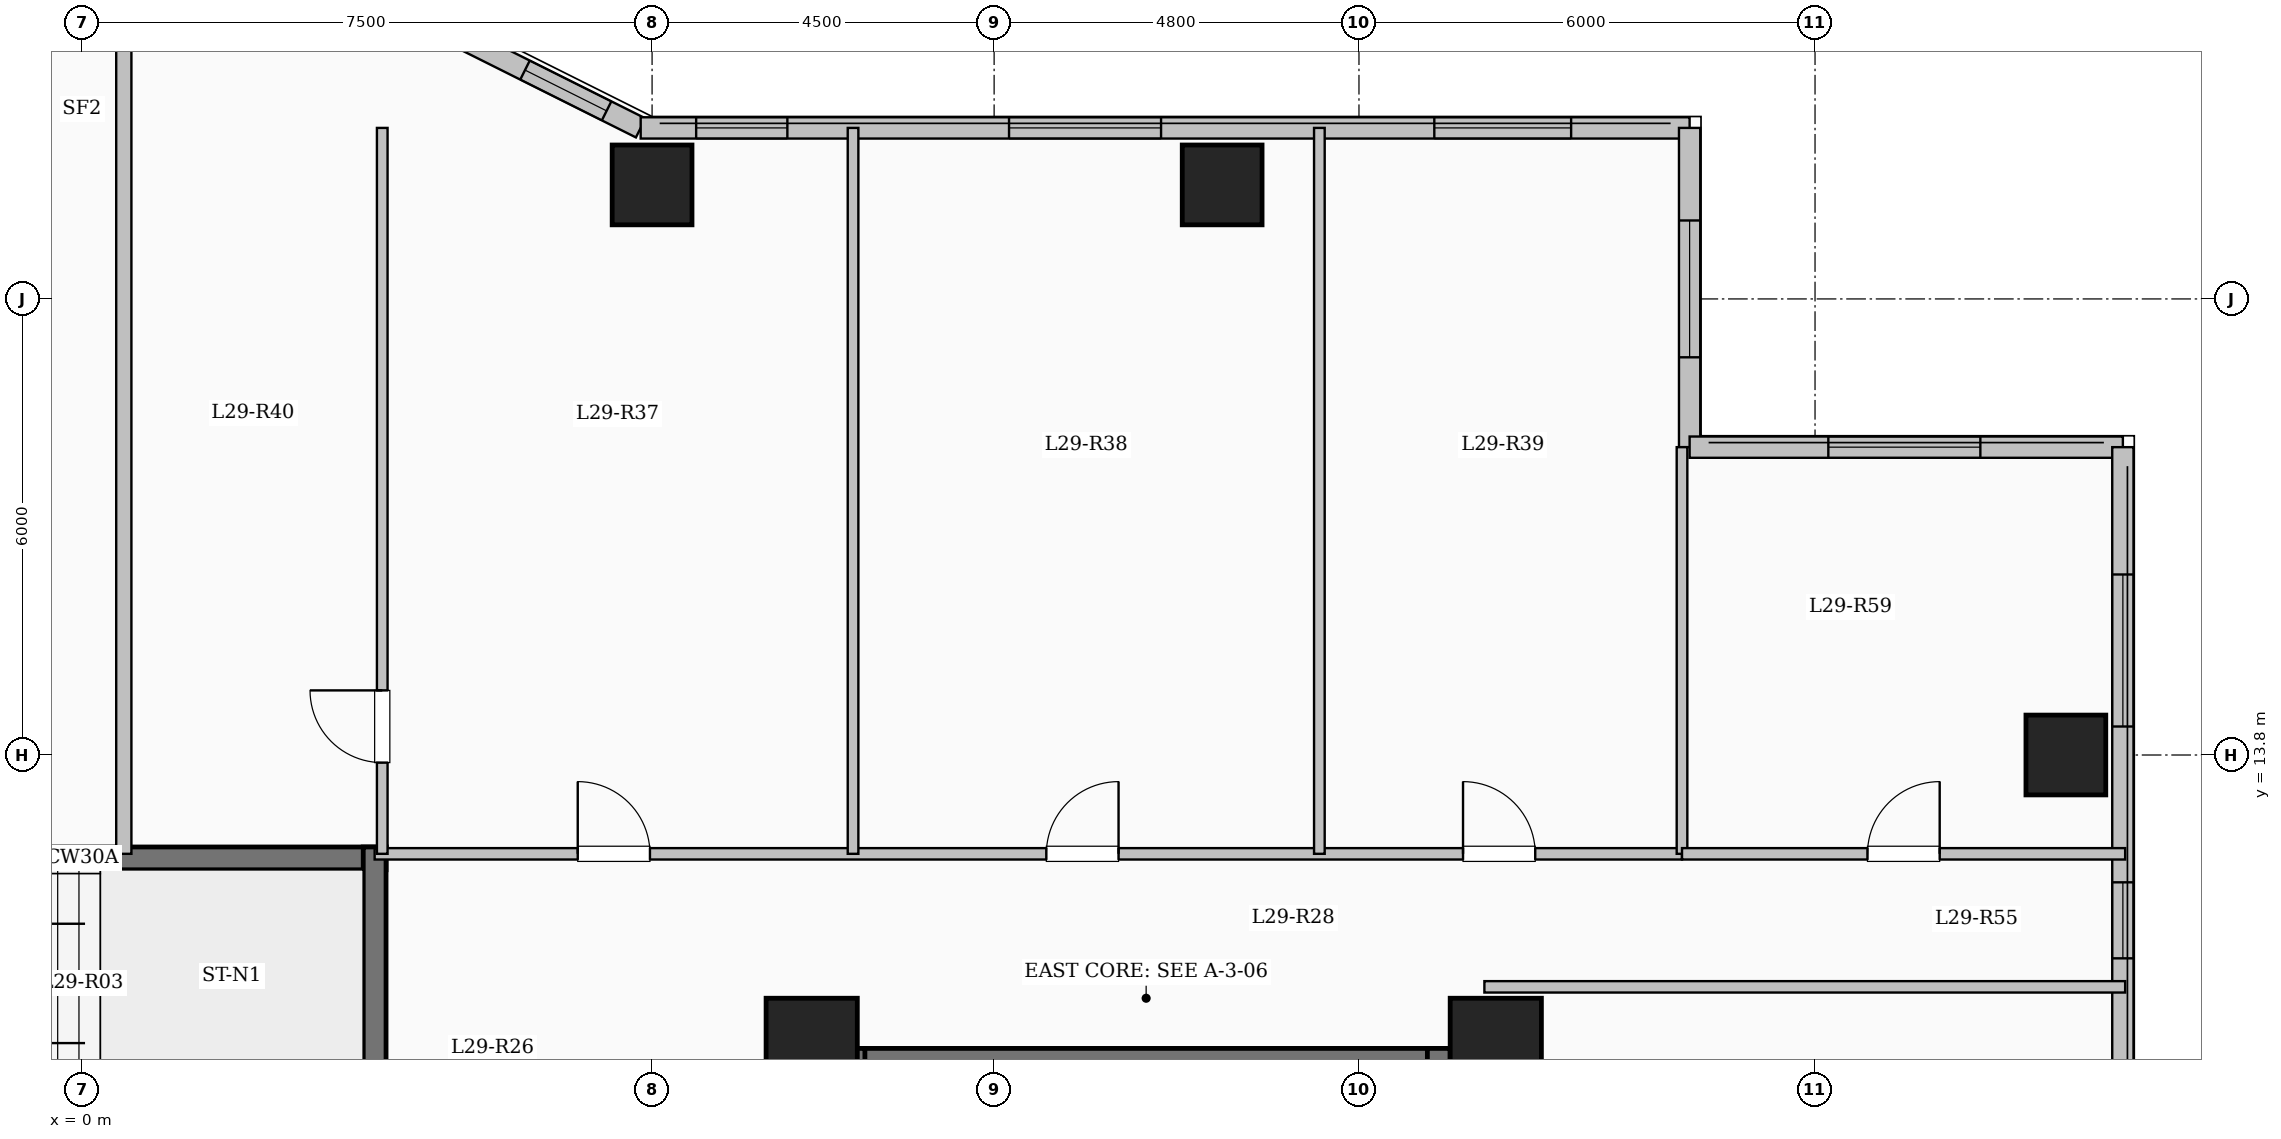
"""IFC4 building model, lengths in metres.
Left out: names, types, materials, properties, quantities, classifications, styles, units other than length and angle.
Written with IfcOpenShell. Run it as: python <this file> out.ifc"""

import sys

from ifc_helpers import new_model, si_unit, direction, frame, frame_2d, origin, origin_2d, place, context, subcontext, project, spatial, rectangle, extrude, element, fill, save


model = new_model("IFC4")
c1 = context("Model", 3, precision=1e-05, world=origin(), true_north=direction((0.0, 1.0)))
c2 = subcontext(c1, "Body", "Model", "MODEL_VIEW")
j1 = project(units=[si_unit("LENGTHUNIT", "METRE"), si_unit("PLANEANGLEUNIT", "RADIAN")], contexts=[c1])
p1 = place(None, origin())
s1 = spatial("IfcSite", under=j1, at=p1, CompositionType="ELEMENT")
p2 = place(p1, origin())
s2 = spatial("IfcBuilding", under=s1, at=p2, CompositionType="ELEMENT")
p3 = place(p2, frame((0.0, 0.0, 108.45)))
s3 = spatial("IfcBuildingStorey", under=s2, at=p3, CompositionType="ELEMENT", Elevation=108.45)
for number, where, z_axis, x_axis in (
    (1, (9.6, 10.0, 0.0), (0.0, 0.0, 1.0), (1.0, 0.0, 0.0)),
    (2, (18.6, 10.0, 0.0), (0.0, 0.0, 1.0), (1.0, 0.0, 0.0)),
):
    element("IfcColumn", number, at=place(p3, frame(where, z_axis=z_axis, x_axis=x_axis)), inside=s3, PredefinedType="COLUMN", context=c2, shape_type="SweptSolid", body=[
        extrude(rectangle(XDim=1.2, YDim=1.2, at=origin_2d()), origin(), (0.0, 0.0, 1.0), 3.35),
    ])
for number, where, z_axis, x_axis in (
    (3, (7.5, 21.3, 0.0), (0.0, 0.0, 1.0), (1.0, 0.0, 0.0)),
    (4, (15.0, 21.3, 0.0), (0.0, 0.0, 1.0), (1.0, 0.0, 0.0)),
    (5, (26.1, 13.8, 0.0), (0.0, 0.0, 1.0), (1.0, 0.0, 0.0)),
):
    element("IfcColumn", number, at=place(p3, frame(where, z_axis=z_axis, x_axis=x_axis)), inside=s3, PredefinedType="COLUMN", context=c2, shape_type="SweptSolid", body=[
        extrude(rectangle(XDim=1.05, YDim=1.05, at=origin_2d()), origin(), (0.0, 0.0, 1.0), 3.35),
    ])
p4 = place(p3, frame((4.35, 23.55, 0.0), z_axis=(0.0, 0.0, 1.0), x_axis=(0.894427191, -0.4472135955, 0.0)))
e6 = element("IfcWall", 6, at=p4, inside=s3, PredefinedType="SOLIDWALL", context=c2, shape_type="SweptSolid", body=[
    extrude(rectangle(XDim=3.354, YDim=0.28, at=frame_2d((1.677, 0.0))), origin(), (0.0, 0.0, 1.0), 3.1),
])
p5 = place(p4, frame((1.653, 0.0, 0.95)))
e7 = element("IfcOpeningElement", 7, at=p5, cuts=e6, PredefinedType="OPENING", context=c2, shape_type="SweptSolid", body=[
    extrude(rectangle(XDim=1.2, YDim=1.5, at=frame_2d((0.6, 0.75))), frame((0.0, 0.15, 0.0), z_axis=(0.0, -1.0, 0.0), x_axis=(1.0, 0.0, 0.0)), (0.0, 0.0, 1.0), 0.3),
])
p6 = place(p3, frame((7.35, 22.05, 0.0), z_axis=(0.0, 0.0, 1.0), x_axis=(1.0, 0.0, 0.0)))
e8 = element("IfcWall", 8, at=p6, inside=s3, PredefinedType="SOLIDWALL", context=c2, shape_type="SweptSolid", body=[
    extrude(rectangle(XDim=13.8, YDim=0.28, at=frame_2d((6.9, 0.0))), origin(), (0.0, 0.0, 1.0), 3.1),
])
p7 = place(p6, frame((0.73, 0.0, 0.95)))
e9 = element("IfcOpeningElement", 9, at=p7, cuts=e8, PredefinedType="OPENING", context=c2, shape_type="SweptSolid", body=[
    extrude(rectangle(XDim=1.2, YDim=1.5, at=frame_2d((0.6, 0.75))), frame((0.0, 0.15, 0.0), z_axis=(0.0, -1.0, 0.0), x_axis=(1.0, 0.0, 0.0)), (0.0, 0.0, 1.0), 0.3),
])
p8 = place(p6, frame((4.846, 0.0, 0.9)))
e10 = element("IfcOpeningElement", 10, at=p8, cuts=e8, PredefinedType="OPENING", context=c2, shape_type="SweptSolid", body=[
    extrude(rectangle(XDim=2.0, YDim=1.7, at=frame_2d((1.0, 0.85))), frame((0.0, 0.15, 0.0), z_axis=(0.0, -1.0, 0.0), x_axis=(1.0, 0.0, 0.0)), (0.0, 0.0, 1.0), 0.3),
])
p9 = place(p6, frame((10.441, 0.0, 0.9)))
e11 = element("IfcOpeningElement", 11, at=p9, cuts=e8, PredefinedType="OPENING", context=c2, shape_type="SweptSolid", body=[
    extrude(rectangle(XDim=1.8, YDim=1.65, at=frame_2d((0.9, 0.825))), frame((0.0, 0.15, 0.0), z_axis=(0.0, -1.0, 0.0), x_axis=(1.0, 0.0, 0.0)), (0.0, 0.0, 1.0), 0.3),
])
p10 = place(p3, frame((21.15, 22.05, 0.0), z_axis=(0.0, 0.0, 1.0), x_axis=(0.0, -1.0, 0.0)))
e12 = element("IfcWall", 12, at=p10, inside=s3, PredefinedType="SOLIDWALL", context=c2, shape_type="SweptSolid", body=[
    extrude(rectangle(XDim=4.2, YDim=0.28, at=frame_2d((2.1, 0.0))), origin(), (0.0, 0.0, 1.0), 3.1),
])
p11 = place(p10, frame((1.218, 0.0, 0.9)))
e13 = element("IfcOpeningElement", 13, at=p11, cuts=e12, PredefinedType="OPENING", context=c2, shape_type="SweptSolid", body=[
    extrude(rectangle(XDim=1.8, YDim=1.65, at=frame_2d((0.9, 0.825))), frame((0.0, 0.15, 0.0), z_axis=(0.0, -1.0, 0.0), x_axis=(1.0, 0.0, 0.0)), (0.0, 0.0, 1.0), 0.3),
])
p12 = place(p3, frame((21.15, 17.85, 0.0), z_axis=(0.0, 0.0, 1.0), x_axis=(1.0, 0.0, 0.0)))
e14 = element("IfcWall", 14, at=p12, inside=s3, PredefinedType="SOLIDWALL", context=c2, shape_type="SweptSolid", body=[
    extrude(rectangle(XDim=5.7, YDim=0.28, at=frame_2d((2.85, 0.0))), origin(), (0.0, 0.0, 1.0), 3.1),
])
p13 = place(p12, frame((1.825, 0.0, 0.9)))
e15 = element("IfcOpeningElement", 15, at=p13, cuts=e14, PredefinedType="OPENING", context=c2, shape_type="SweptSolid", body=[
    extrude(rectangle(XDim=2.0, YDim=1.7, at=frame_2d((1.0, 0.85))), frame((0.0, 0.15, 0.0), z_axis=(0.0, -1.0, 0.0), x_axis=(1.0, 0.0, 0.0)), (0.0, 0.0, 1.0), 0.3),
])
p14 = place(p3, frame((26.85, 17.85, 0.0), z_axis=(0.0, 0.0, 1.0), x_axis=(0.0, -1.0, 0.0)))
e16 = element("IfcWall", 16, at=p14, inside=s3, PredefinedType="SOLIDWALL", context=c2, shape_type="SweptSolid", body=[
    extrude(rectangle(XDim=35.7, YDim=0.28, at=frame_2d((17.85, 0.0))), origin(), (0.0, 0.0, 1.0), 3.1),
])
p15 = place(p14, frame((1.675, 0.0, 0.9)))
e17 = element("IfcOpeningElement", 17, at=p15, cuts=e16, PredefinedType="OPENING", context=c2, shape_type="SweptSolid", body=[
    extrude(rectangle(XDim=2.0, YDim=1.7, at=frame_2d((1.0, 0.85))), frame((0.0, 0.15, 0.0), z_axis=(0.0, -1.0, 0.0), x_axis=(1.0, 0.0, 0.0)), (0.0, 0.0, 1.0), 0.3),
])
p16 = place(p14, frame((5.725, 0.0, 0.95)))
e18 = element("IfcOpeningElement", 18, at=p16, cuts=e16, PredefinedType="OPENING", context=c2, shape_type="SweptSolid", body=[
    extrude(rectangle(XDim=1.0, YDim=1.5, at=frame_2d((0.5, 0.75))), frame((0.0, 0.15, 0.0), z_axis=(0.0, -1.0, 0.0), x_axis=(1.0, 0.0, 0.0)), (0.0, 0.0, 1.0), 0.3),
])
p17 = place(p14, frame((8.975, 0.0, 0.9)))
e19 = element("IfcOpeningElement", 19, at=p17, cuts=e16, PredefinedType="OPENING", context=c2, shape_type="SweptSolid", body=[
    extrude(rectangle(XDim=2.0, YDim=1.7, at=frame_2d((1.0, 0.85))), frame((0.0, 0.15, 0.0), z_axis=(0.0, -1.0, 0.0), x_axis=(1.0, 0.0, 0.0)), (0.0, 0.0, 1.0), 0.3),
])
p18 = place(p14, frame((13.725, 0.0, 0.9)))
e20 = element("IfcOpeningElement", 20, at=p18, cuts=e16, PredefinedType="OPENING", context=c2, shape_type="SweptSolid", body=[
    extrude(rectangle(XDim=1.8, YDim=1.65, at=frame_2d((0.9, 0.825))), frame((0.0, 0.15, 0.0), z_axis=(0.0, -1.0, 0.0), x_axis=(1.0, 0.0, 0.0)), (0.0, 0.0, 1.0), 0.3),
])
p19 = place(p14, frame((19.55, 0.0, 0.9)))
e21 = element("IfcOpeningElement", 21, at=p19, cuts=e16, PredefinedType="OPENING", context=c2, shape_type="SweptSolid", body=[
    extrude(rectangle(XDim=2.4, YDim=1.8, at=frame_2d((1.2, 0.9))), frame((0.0, 0.15, 0.0), z_axis=(0.0, -1.0, 0.0), x_axis=(1.0, 0.0, 0.0)), (0.0, 0.0, 1.0), 0.3),
])
p20 = place(p14, frame((25.857, 0.0, 0.9)))
e22 = element("IfcOpeningElement", 22, at=p20, cuts=e16, PredefinedType="OPENING", context=c2, shape_type="SweptSolid", body=[
    extrude(rectangle(XDim=1.5, YDim=1.65, at=frame_2d((0.75, 0.825))), frame((0.0, 0.15, 0.0), z_axis=(0.0, -1.0, 0.0), x_axis=(1.0, 0.0, 0.0)), (0.0, 0.0, 1.0), 0.3),
])
p21 = place(p14, frame((30.75, 0.0, 0.9)))
e23 = element("IfcOpeningElement", 23, at=p21, cuts=e16, PredefinedType="OPENING", context=c2, shape_type="SweptSolid", body=[
    extrude(rectangle(XDim=2.4, YDim=1.8, at=frame_2d((1.2, 0.9))), frame((0.0, 0.15, 0.0), z_axis=(0.0, -1.0, 0.0), x_axis=(1.0, 0.0, 0.0)), (0.0, 0.0, 1.0), 0.3),
])
p22 = place(p3, frame((10.0, 9.79, 0.0), z_axis=(0.0, 0.0, 1.0), x_axis=(1.0, 0.0, 0.0)))
e24 = element("IfcWall", 24, at=p22, inside=s3, PredefinedType="SHEAR", context=c2, shape_type="SweptSolid", body=[
    extrude(rectangle(XDim=8.0, YDim=0.3, at=frame_2d((4.0, 0.0))), origin(), (0.0, 0.0, 1.0), 3.35),
])
for number, where, z_axis, x_axis in (
    (25, (10.15, 6.35, 0.0), (0.0, 0.0, 1.0), (0.0, 1.0, 0.0)),
    (26, (17.85, 6.35, 0.0), (0.0, 0.0, 1.0), (0.0, 1.0, 0.0)),
):
    element("IfcWall", number, at=place(p3, frame(where, z_axis=z_axis, x_axis=x_axis)), inside=s3, PredefinedType="SHEAR", context=c2, shape_type="SweptSolid", body=[
        extrude(rectangle(XDim=3.59, YDim=0.3, at=frame_2d((1.795, 0.0))), origin(), (0.0, 0.0, 1.0), 3.35),
    ])
p23 = place(p3, frame((-4.0, 12.44, 0.0), z_axis=(0.0, 0.0, 1.0), x_axis=(1.0, 0.0, 0.0)))
e27 = element("IfcWall", 27, at=p23, inside=s3, PredefinedType="SHEAR", context=c2, shape_type="SweptSolid", body=[
    extrude(rectangle(XDim=8.0, YDim=0.3, at=frame_2d((4.0, 0.0))), origin(), (0.0, 0.0, 1.0), 3.35),
])
p24 = place(p3, frame((3.85, 9.0, 0.0), z_axis=(0.0, 0.0, 1.0), x_axis=(0.0, 1.0, 0.0)))
e28 = element("IfcWall", 28, at=p24, inside=s3, PredefinedType="SHEAR", context=c2, shape_type="SweptSolid", body=[
    extrude(rectangle(XDim=3.59, YDim=0.3, at=frame_2d((1.795, 0.0))), origin(), (0.0, 0.0, 1.0), 3.35),
])
p25 = place(p3, frame((3.85, 12.5, 0.0), z_axis=(0.0, 0.0, 1.0), x_axis=(1.0, 0.0, 0.0)))
e29 = element("IfcWall", 29, at=p25, inside=s3, PredefinedType="PARTITIONING", context=c2, shape_type="SweptSolid", body=[
    extrude(rectangle(XDim=17.2, YDim=0.15, at=frame_2d((8.6, 0.0))), origin(), (0.0, 0.0, 1.0), 3.1),
])
p26 = place(p25, frame((2.672, 0.0, 0.0)))
e30 = element("IfcOpeningElement", 30, at=p26, cuts=e29, PredefinedType="OPENING", context=c2, shape_type="SweptSolid", body=[
    extrude(rectangle(XDim=0.95, YDim=2.15, at=frame_2d((0.475, 1.075))), frame((0.0, 0.085, 0.0), z_axis=(0.0, -1.0, 0.0), x_axis=(1.0, 0.0, 0.0)), (0.0, 0.0, 1.0), 0.17),
])
p27 = place(p25, frame((8.837, 0.0, 0.0)))
e31 = element("IfcOpeningElement", 31, at=p27, cuts=e29, PredefinedType="OPENING", context=c2, shape_type="SweptSolid", body=[
    extrude(rectangle(XDim=0.95, YDim=2.15, at=frame_2d((0.475, 1.075))), frame((0.0, 0.085, 0.0), z_axis=(0.0, -1.0, 0.0), x_axis=(1.0, 0.0, 0.0)), (0.0, 0.0, 1.0), 0.17),
])
p28 = place(p25, frame((14.319, 0.0, 0.0)))
e32 = element("IfcOpeningElement", 32, at=p28, cuts=e29, PredefinedType="OPENING", context=c2, shape_type="SweptSolid", body=[
    extrude(rectangle(XDim=0.95, YDim=2.15, at=frame_2d((0.475, 1.075))), frame((0.0, 0.085, 0.0), z_axis=(0.0, -1.0, 0.0), x_axis=(1.0, 0.0, 0.0)), (0.0, 0.0, 1.0), 0.17),
])
p29 = place(p3, frame((0.55, 12.5, 0.0), z_axis=(0.0, 0.0, 1.0), x_axis=(0.0, 1.0, 0.0)))
e33 = element("IfcWall", 33, at=p29, inside=s3, PredefinedType="SOLIDWALL", context=c2, shape_type="SweptSolid", body=[
    extrude(rectangle(XDim=11.08, YDim=0.2, at=frame_2d((5.54, 0.0))), origin(), (0.0, 0.0, 1.0), 3.1),
])
p30 = place(p3, frame((3.95, 12.5, 0.0), z_axis=(0.0, 0.0, 1.0), x_axis=(0.0, 1.0, 0.0)))
e34 = element("IfcWall", 34, at=p30, inside=s3, PredefinedType="PARTITIONING", context=c2, shape_type="SweptSolid", body=[
    extrude(rectangle(XDim=9.55, YDim=0.14, at=frame_2d((4.775, 0.0))), origin(), (0.0, 0.0, 1.0), 3.1),
])
p31 = place(p30, frame((1.2, 0.0, 0.0)))
e35 = element("IfcOpeningElement", 35, at=p31, cuts=e34, PredefinedType="OPENING", context=c2, shape_type="SweptSolid", body=[
    extrude(rectangle(XDim=0.95, YDim=2.15, at=frame_2d((0.475, 1.075))), frame((0.0, 0.08, 0.0), z_axis=(0.0, -1.0, 0.0), x_axis=(1.0, 0.0, 0.0)), (0.0, 0.0, 1.0), 0.16),
])
for number, where, z_axis, x_axis in (
    (36, (10.144, 12.5, 0.0), (0.0, 0.0, 1.0), (0.0, 1.0, 0.0)),
    (37, (16.279, 12.5, 0.0), (0.0, 0.0, 1.0), (0.0, 1.0, 0.0)),
):
    element("IfcWall", number, at=place(p3, frame(where, z_axis=z_axis, x_axis=x_axis)), inside=s3, PredefinedType="PARTITIONING", context=c2, shape_type="SweptSolid", body=[
        extrude(rectangle(XDim=9.55, YDim=0.14, at=frame_2d((4.775, 0.0))), origin(), (0.0, 0.0, 1.0), 3.1),
    ])
p32 = place(p3, frame((18.45, 10.75, 0.0), z_axis=(0.0, 0.0, 1.0), x_axis=(1.0, 0.0, 0.0)))
e38 = element("IfcWall", 38, at=p32, inside=s3, PredefinedType="PARTITIONING", context=c2, shape_type="SweptSolid", body=[
    extrude(rectangle(XDim=8.43, YDim=0.15, at=frame_2d((4.215, 0.0))), origin(), (0.0, 0.0, 1.0), 3.1),
])
p33 = place(p3, frame((21.05, 12.5, 0.0), z_axis=(0.0, 0.0, 1.0), x_axis=(0.0, 1.0, 0.0)))
e39 = element("IfcWall", 39, at=p33, inside=s3, PredefinedType="PARTITIONING", context=c2, shape_type="SweptSolid", body=[
    extrude(rectangle(XDim=5.35, YDim=0.14, at=frame_2d((2.675, 0.0))), origin(), (0.0, 0.0, 1.0), 3.1),
])
p34 = place(p3, frame((21.05, 12.5, 0.0), z_axis=(0.0, 0.0, 1.0), x_axis=(1.0, 0.0, 0.0)))
e40 = element("IfcWall", 40, at=p34, inside=s3, PredefinedType="PARTITIONING", context=c2, shape_type="SweptSolid", body=[
    extrude(rectangle(XDim=5.83, YDim=0.15, at=frame_2d((2.915, 0.0))), origin(), (0.0, 0.0, 1.0), 3.1),
])
p35 = place(p34, frame((2.44, 0.0, 0.0)))
e41 = element("IfcOpeningElement", 41, at=p35, cuts=e40, PredefinedType="OPENING", context=c2, shape_type="SweptSolid", body=[
    extrude(rectangle(XDim=0.95, YDim=2.15, at=frame_2d((0.475, 1.075))), frame((0.0, 0.085, 0.0), z_axis=(0.0, -1.0, 0.0), x_axis=(1.0, 0.0, 0.0)), (0.0, 0.0, 1.0), 0.17),
])
p36 = place(p5, origin())
e42 = element("IfcWindow", 42, at=p36, inside=s3, PartitioningType="SINGLE_PANEL", PredefinedType="WINDOW", context=c2, shape_type="SweptSolid", body=[
    extrude(rectangle(XDim=1.2, YDim=1.5, at=frame_2d((0.6, 0.75))), frame((0.0, 0.03, 0.0), z_axis=(0.0, -1.0, 0.0), x_axis=(1.0, 0.0, 0.0)), (0.0, 0.0, 1.0), 0.06),
])
fill(e7, e42)
p37 = place(p7, origin())
e43 = element("IfcWindow", 43, at=p37, inside=s3, PartitioningType="SINGLE_PANEL", PredefinedType="WINDOW", context=c2, shape_type="SweptSolid", body=[
    extrude(rectangle(XDim=1.2, YDim=1.5, at=frame_2d((0.6, 0.75))), frame((0.0, 0.03, 0.0), z_axis=(0.0, -1.0, 0.0), x_axis=(1.0, 0.0, 0.0)), (0.0, 0.0, 1.0), 0.06),
])
fill(e9, e43)
p38 = place(p8, origin())
e44 = element("IfcWindow", 44, at=p38, inside=s3, PartitioningType="SINGLE_PANEL", PredefinedType="WINDOW", context=c2, shape_type="SweptSolid", body=[
    extrude(rectangle(XDim=2.0, YDim=1.7, at=frame_2d((1.0, 0.85))), frame((0.0, 0.03, 0.0), z_axis=(0.0, -1.0, 0.0), x_axis=(1.0, 0.0, 0.0)), (0.0, 0.0, 1.0), 0.06),
])
fill(e10, e44)
p39 = place(p9, origin())
e45 = element("IfcWindow", 45, at=p39, inside=s3, PartitioningType="SINGLE_PANEL", PredefinedType="WINDOW", context=c2, shape_type="SweptSolid", body=[
    extrude(rectangle(XDim=1.8, YDim=1.65, at=frame_2d((0.9, 0.825))), frame((0.0, 0.03, 0.0), z_axis=(0.0, -1.0, 0.0), x_axis=(1.0, 0.0, 0.0)), (0.0, 0.0, 1.0), 0.06),
])
fill(e11, e45)
p40 = place(p11, origin())
e46 = element("IfcWindow", 46, at=p40, inside=s3, PartitioningType="SINGLE_PANEL", PredefinedType="WINDOW", context=c2, shape_type="SweptSolid", body=[
    extrude(rectangle(XDim=1.8, YDim=1.65, at=frame_2d((0.9, 0.825))), frame((0.0, 0.03, 0.0), z_axis=(0.0, -1.0, 0.0), x_axis=(1.0, 0.0, 0.0)), (0.0, 0.0, 1.0), 0.06),
])
fill(e13, e46)
p41 = place(p13, origin())
e47 = element("IfcWindow", 47, at=p41, inside=s3, PartitioningType="SINGLE_PANEL", PredefinedType="WINDOW", context=c2, shape_type="SweptSolid", body=[
    extrude(rectangle(XDim=2.0, YDim=1.7, at=frame_2d((1.0, 0.85))), frame((0.0, 0.03, 0.0), z_axis=(0.0, -1.0, 0.0), x_axis=(1.0, 0.0, 0.0)), (0.0, 0.0, 1.0), 0.06),
])
fill(e15, e47)
p42 = place(p15, origin())
e48 = element("IfcWindow", 48, at=p42, inside=s3, PartitioningType="SINGLE_PANEL", PredefinedType="WINDOW", context=c2, shape_type="SweptSolid", body=[
    extrude(rectangle(XDim=2.0, YDim=1.7, at=frame_2d((1.0, 0.85))), frame((0.0, 0.03, 0.0), z_axis=(0.0, -1.0, 0.0), x_axis=(1.0, 0.0, 0.0)), (0.0, 0.0, 1.0), 0.06),
])
fill(e17, e48)
p43 = place(p16, origin())
e49 = element("IfcWindow", 49, at=p43, inside=s3, PartitioningType="SINGLE_PANEL", PredefinedType="WINDOW", context=c2, shape_type="SweptSolid", body=[
    extrude(rectangle(XDim=1.0, YDim=1.5, at=frame_2d((0.5, 0.75))), frame((0.0, 0.03, 0.0), z_axis=(0.0, -1.0, 0.0), x_axis=(1.0, 0.0, 0.0)), (0.0, 0.0, 1.0), 0.06),
])
fill(e18, e49)
p44 = place(p26, origin())
e50 = element("IfcDoor", 50, at=p44, inside=s3, OperationType="SINGLE_SWING_LEFT", PredefinedType="DOOR", context=c2, shape_type="SweptSolid", body=[
    extrude(rectangle(XDim=0.95, YDim=2.15, at=frame_2d((0.475, 1.075))), frame((0.0, 0.025, 0.0), z_axis=(0.0, -1.0, 0.0), x_axis=(1.0, 0.0, 0.0)), (0.0, 0.0, 1.0), 0.05),
])
fill(e30, e50)
p45 = place(p27, origin())
e51 = element("IfcDoor", 51, at=p45, inside=s3, OperationType="SINGLE_SWING_RIGHT", PredefinedType="DOOR", context=c2, shape_type="SweptSolid", body=[
    extrude(rectangle(XDim=0.95, YDim=2.15, at=frame_2d((0.475, 1.075))), frame((0.0, 0.025, 0.0), z_axis=(0.0, -1.0, 0.0), x_axis=(1.0, 0.0, 0.0)), (0.0, 0.0, 1.0), 0.05),
])
fill(e31, e51)
p46 = place(p28, origin())
e52 = element("IfcDoor", 52, at=p46, inside=s3, OperationType="SINGLE_SWING_LEFT", PredefinedType="DOOR", context=c2, shape_type="SweptSolid", body=[
    extrude(rectangle(XDim=0.95, YDim=2.15, at=frame_2d((0.475, 1.075))), frame((0.0, 0.025, 0.0), z_axis=(0.0, -1.0, 0.0), x_axis=(1.0, 0.0, 0.0)), (0.0, 0.0, 1.0), 0.05),
])
fill(e32, e52)
p47 = place(p31, origin())
e53 = element("IfcDoor", 53, at=p47, inside=s3, OperationType="SINGLE_SWING_RIGHT", PredefinedType="DOOR", context=c2, shape_type="SweptSolid", body=[
    extrude(rectangle(XDim=0.95, YDim=2.15, at=frame_2d((0.475, 1.075))), frame((0.0, 0.025, 0.0), z_axis=(0.0, -1.0, 0.0), x_axis=(1.0, 0.0, 0.0)), (0.0, 0.0, 1.0), 0.05),
])
fill(e35, e53)
p48 = place(p35, origin())
e54 = element("IfcDoor", 54, at=p48, inside=s3, OperationType="SINGLE_SWING_RIGHT", PredefinedType="DOOR", context=c2, shape_type="SweptSolid", body=[
    extrude(rectangle(XDim=0.95, YDim=2.15, at=frame_2d((0.475, 1.075))), frame((0.0, 0.025, 0.0), z_axis=(0.0, -1.0, 0.0), x_axis=(1.0, 0.0, 0.0)), (0.0, 0.0, 1.0), 0.05),
])
fill(e41, e54)
save(model, sys.argv[1])
